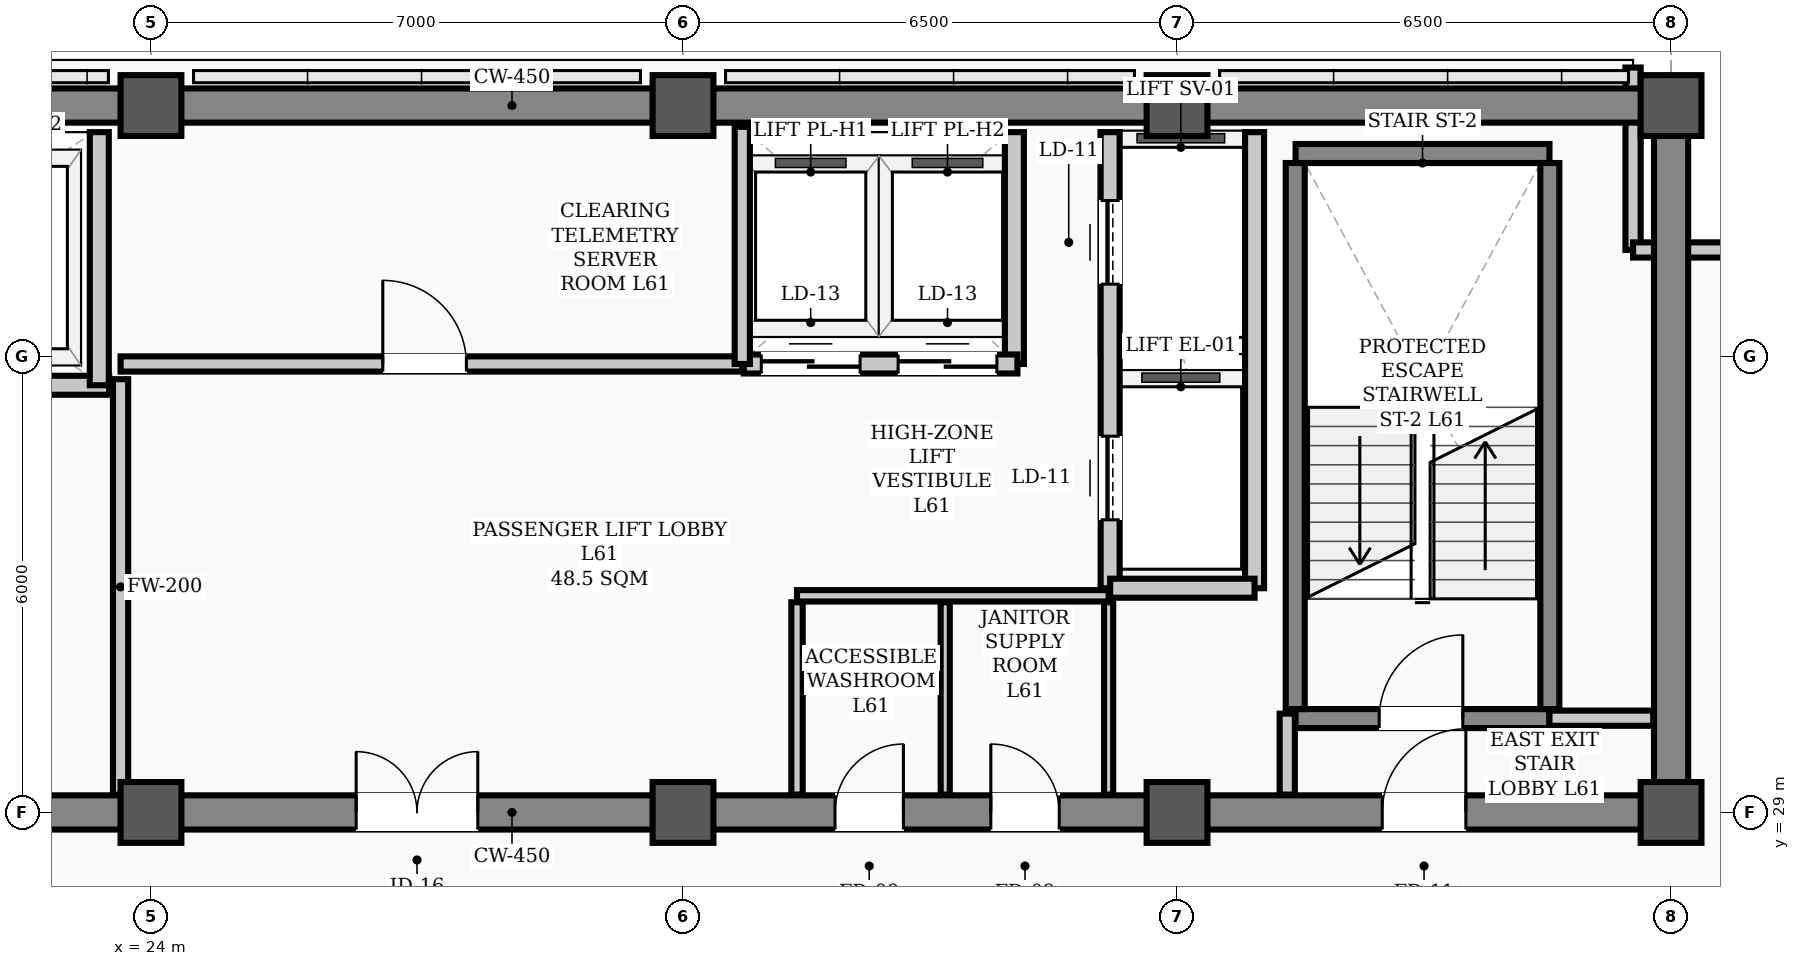
"""IFC4 building model, lengths in metres.
Left out: names, types, materials, properties, quantities, classifications, styles, units other than length and angle.
Written with IfcOpenShell. Run it as: python <this file> out.ifc"""

import sys

from ifc_helpers import new_model, si_unit, direction, frame, frame_2d, origin, origin_2d, place, context, subcontext, project, spatial, rectangle, hollow_rectangle, extrude, element, fill, save


model = new_model("IFC4")
c1 = context("Model", 3, precision=1e-05, world=origin(), true_north=direction((0.0, 1.0)))
c2 = subcontext(c1, "Body", "Model", "MODEL_VIEW")
j1 = project(units=[si_unit("LENGTHUNIT", "METRE"), si_unit("PLANEANGLEUNIT", "RADIAN")], contexts=[c1])
p1 = place(None, origin())
s1 = spatial("IfcSite", under=j1, at=p1, CompositionType="ELEMENT")
p2 = place(p1, origin())
s2 = spatial("IfcBuilding", under=s1, at=p2, CompositionType="ELEMENT")
p3 = place(p2, frame((0.0, 0.0, 246.2)))
s3 = spatial("IfcBuildingStorey", under=s2, at=p3, CompositionType="ELEMENT", Elevation=246.2)
for number, where, z_axis, x_axis in (
    (1, (24.0, 29.0, 0.0), (0.0, 0.0, 1.0), (1.0, 0.0, 0.0)),
    (2, (24.0, 38.3, 0.0), (0.0, 0.0, 1.0), (1.0, 0.0, 0.0)),
    (3, (31.0, 29.0, 0.0), (0.0, 0.0, 1.0), (1.0, 0.0, 0.0)),
    (4, (31.0, 38.3, 0.0), (0.0, 0.0, 1.0), (1.0, 0.0, 0.0)),
    (5, (37.5, 29.0, 0.0), (0.0, 0.0, 1.0), (1.0, 0.0, 0.0)),
    (6, (37.5, 38.3, 0.0), (0.0, 0.0, 1.0), (1.0, 0.0, 0.0)),
    (7, (44.0, 29.0, 0.0), (0.0, 0.0, 1.0), (1.0, 0.0, 0.0)),
    (8, (44.0, 38.3, 0.0), (0.0, 0.0, 1.0), (1.0, 0.0, 0.0)),
):
    element("IfcColumn", number, at=place(p3, frame(where, z_axis=z_axis, x_axis=x_axis)), inside=s3, PredefinedType="COLUMN", context=c2, shape_type="SweptSolid", body=[
        extrude(hollow_rectangle(XDim=0.8, YDim=0.8, WallThickness=0.032, InnerFilletRadius=0.016, OuterFilletRadius=0.048, at=origin_2d()), origin(), (0.0, 0.0, 1.0), 3.9),
    ])
p4 = place(p3, frame((43.5, 38.8, 0.0), z_axis=(0.0, 0.0, 1.0), x_axis=(0.0, -1.0, 0.0)))
e9 = element("IfcWall", 9, at=p4, inside=s3, PredefinedType="PARAPET", context=c2, shape_type="SweptSolid", body=[
    extrude(rectangle(XDim=2.4, YDim=0.2, at=frame_2d((1.2, 0.0))), origin(), (0.0, 0.0, 1.0), 1.2),
])
p5 = place(p3, frame((43.5, 36.4, 0.0), z_axis=(0.0, 0.0, 1.0), x_axis=(1.0, 0.0, 0.0)))
e10 = element("IfcWall", 10, at=p5, inside=s3, PredefinedType="PARAPET", context=c2, shape_type="SweptSolid", body=[
    extrude(rectangle(XDim=2.4, YDim=0.2, at=frame_2d((1.2, 0.0))), origin(), (0.0, 0.0, 1.0), 1.2),
])
p6 = place(p3, frame((13.5, 29.0, 0.0), z_axis=(0.0, 0.0, 1.0), x_axis=(1.0, 0.0, 0.0)))
e11 = element("IfcWall", 11, at=p6, inside=s3, PredefinedType="SHEAR", context=c2, shape_type="SweptSolid", body=[
    extrude(rectangle(XDim=30.5, YDim=0.45, at=frame_2d((15.25, 0.0))), origin(), (0.0, 0.0, 1.0), 3.72),
])
p7 = place(p6, frame((1.75, 0.0, 0.0)))
e12 = element("IfcOpeningElement", 12, at=p7, cuts=e11, PredefinedType="OPENING", context=c2, shape_type="SweptSolid", body=[
    extrude(rectangle(XDim=1.1, YDim=2.08, at=frame_2d((0.55, 1.04))), frame((0.0, 0.235, 0.0), z_axis=(0.0, -1.0, 0.0), x_axis=(1.0, 0.0, 0.0)), (0.0, 0.0, 1.0), 0.47),
])
p8 = place(p6, frame((26.7, 0.0, 0.0)))
e13 = element("IfcOpeningElement", 13, at=p8, cuts=e11, PredefinedType="OPENING", context=c2, shape_type="SweptSolid", body=[
    extrude(rectangle(XDim=1.1, YDim=2.08, at=frame_2d((0.55, 1.04))), frame((0.0, 0.235, 0.0), z_axis=(0.0, -1.0, 0.0), x_axis=(1.0, 0.0, 0.0)), (0.0, 0.0, 1.0), 0.47),
])
p9 = place(p6, frame((6.8, 0.0, 0.0)))
e14 = element("IfcOpeningElement", 14, at=p9, cuts=e11, PredefinedType="OPENING", context=c2, shape_type="SweptSolid", body=[
    extrude(rectangle(XDim=1.1, YDim=2.08, at=frame_2d((0.55, 1.04))), frame((0.0, 0.235, 0.0), z_axis=(0.0, -1.0, 0.0), x_axis=(1.0, 0.0, 0.0)), (0.0, 0.0, 1.0), 0.47),
])
p10 = place(p6, frame((13.2, 0.0, 0.0)))
e15 = element("IfcOpeningElement", 15, at=p10, cuts=e11, PredefinedType="OPENING", context=c2, shape_type="SweptSolid", body=[
    extrude(rectangle(XDim=1.6, YDim=2.08, at=frame_2d((0.8, 1.04))), frame((0.0, 0.235, 0.0), z_axis=(0.0, -1.0, 0.0), x_axis=(1.0, 0.0, 0.0)), (0.0, 0.0, 1.0), 0.47),
])
p11 = place(p6, frame((19.5, 0.0, 0.0)))
e16 = element("IfcOpeningElement", 16, at=p11, cuts=e11, PredefinedType="OPENING", context=c2, shape_type="SweptSolid", body=[
    extrude(rectangle(XDim=0.9, YDim=2.08, at=frame_2d((0.45, 1.04))), frame((0.0, 0.235, 0.0), z_axis=(0.0, -1.0, 0.0), x_axis=(1.0, 0.0, 0.0)), (0.0, 0.0, 1.0), 0.47),
])
p12 = place(p6, frame((21.55, 0.0, 0.0)))
e17 = element("IfcOpeningElement", 17, at=p12, cuts=e11, PredefinedType="OPENING", context=c2, shape_type="SweptSolid", body=[
    extrude(rectangle(XDim=0.9, YDim=2.08, at=frame_2d((0.45, 1.04))), frame((0.0, 0.235, 0.0), z_axis=(0.0, -1.0, 0.0), x_axis=(1.0, 0.0, 0.0)), (0.0, 0.0, 1.0), 0.47),
])
p13 = place(p3, frame((13.5, 38.3, 0.0), z_axis=(0.0, 0.0, 1.0), x_axis=(1.0, 0.0, 0.0)))
e18 = element("IfcWall", 18, at=p13, inside=s3, PredefinedType="SHEAR", context=c2, shape_type="SweptSolid", body=[
    extrude(rectangle(XDim=30.5, YDim=0.45, at=frame_2d((15.25, 0.0))), origin(), (0.0, 0.0, 1.0), 3.72),
])
p14 = place(p3, frame((44.0, 29.35, 0.0), z_axis=(0.0, 0.0, 1.0), x_axis=(0.0, 1.0, 0.0)))
e19 = element("IfcWall", 19, at=p14, inside=s3, PredefinedType="SHEAR", context=c2, shape_type="SweptSolid", body=[
    extrude(rectangle(XDim=8.6, YDim=0.45, at=frame_2d((4.3, 0.0))), origin(), (0.0, 0.0, 1.0), 3.72),
])
p15 = place(p3, frame((39.06, 30.235, 0.0), z_axis=(0.0, 0.0, 1.0), x_axis=(1.0, 0.0, 0.0)))
e20 = element("IfcWall", 20, at=p15, inside=s3, PredefinedType="STANDARD", context=c2, shape_type="SweptSolid", body=[
    extrude(rectangle(XDim=3.34, YDim=0.25, at=frame_2d((1.67, 0.0))), origin(), (0.0, 0.0, 1.0), 3.72),
])
p16 = place(p15, frame((1.1, 0.0, 0.0)))
e21 = element("IfcOpeningElement", 21, at=p16, cuts=e20, PredefinedType="OPENING", context=c2, shape_type="SweptSolid", body=[
    extrude(rectangle(XDim=1.1, YDim=2.08, at=frame_2d((0.55, 1.04))), frame((0.0, 0.135, 0.0), z_axis=(0.0, -1.0, 0.0), x_axis=(1.0, 0.0, 0.0)), (0.0, 0.0, 1.0), 0.27),
])
p17 = place(p3, frame((39.06, 37.669, 0.0), z_axis=(0.0, 0.0, 1.0), x_axis=(1.0, 0.0, 0.0)))
e22 = element("IfcWall", 22, at=p17, inside=s3, PredefinedType="STANDARD", context=c2, shape_type="SweptSolid", body=[
    extrude(rectangle(XDim=3.34, YDim=0.25, at=frame_2d((1.67, 0.0))), origin(), (0.0, 0.0, 1.0), 3.72),
])
for number, where, z_axis, x_axis in (
    (23, (39.055, 30.36, 0.0), (0.0, 0.0, 1.0), (0.0, 1.0, 0.0)),
    (24, (42.405, 30.36, 0.0), (0.0, 0.0, 1.0), (0.0, 1.0, 0.0)),
):
    element("IfcWall", number, at=place(p3, frame(where, z_axis=z_axis, x_axis=x_axis)), inside=s3, PredefinedType="STANDARD", context=c2, shape_type="SweptSolid", body=[
        extrude(rectangle(XDim=7.184, YDim=0.25, at=frame_2d((3.592, 0.0))), origin(), (0.0, 0.0, 1.0), 3.72),
    ])
p18 = place(p3, frame((18.1, 34.62, 0.0), z_axis=(0.0, 0.0, 1.0), x_axis=(1.0, 0.0, 0.0)))
e25 = element("IfcWall", 25, at=p18, inside=s3, PredefinedType="STANDARD", context=c2, shape_type="SweptSolid", body=[
    extrude(rectangle(XDim=5.35, YDim=0.25, at=frame_2d((2.675, 0.0))), origin(), (0.0, 0.0, 1.0), 3.72),
])
p19 = place(p18, frame((0.85, 0.0, 0.0)))
e26 = element("IfcOpeningElement", 26, at=p19, cuts=e25, PredefinedType="OPENING", context=c2, shape_type="SweptSolid", body=[
    extrude(rectangle(XDim=1.1, YDim=2.08, at=frame_2d((0.55, 1.04))), frame((0.0, 0.135, 0.0), z_axis=(0.0, -1.0, 0.0), x_axis=(1.0, 0.0, 0.0)), (0.0, 0.0, 1.0), 0.27),
])
p20 = place(p18, frame((3.45, 0.0, 0.0)))
e27 = element("IfcOpeningElement", 27, at=p20, cuts=e25, PredefinedType="OPENING", context=c2, shape_type="SweptSolid", body=[
    extrude(rectangle(XDim=1.1, YDim=2.08, at=frame_2d((0.55, 1.04))), frame((0.0, 0.135, 0.0), z_axis=(0.0, -1.0, 0.0), x_axis=(1.0, 0.0, 0.0)), (0.0, 0.0, 1.0), 0.27),
])
p21 = place(p3, frame((36.62, 31.95, 0.0), z_axis=(0.0, 0.0, 1.0), x_axis=(0.0, 1.0, 0.0)))
e28 = element("IfcWall", 28, at=p21, inside=s3, PredefinedType="STANDARD", context=c2, shape_type="SweptSolid", body=[
    extrude(rectangle(XDim=6.0, YDim=0.25, at=frame_2d((3.0, 0.0))), origin(), (0.0, 0.0, 1.0), 3.72),
])
p22 = place(p21, frame((0.9, 0.0, 0.0)))
e29 = element("IfcOpeningElement", 29, at=p22, cuts=e28, PredefinedType="OPENING", context=c2, shape_type="SweptSolid", body=[
    extrude(rectangle(XDim=1.1, YDim=2.08, at=frame_2d((0.55, 1.04))), frame((0.0, 0.135, 0.0), z_axis=(0.0, -1.0, 0.0), x_axis=(1.0, 0.0, 0.0)), (0.0, 0.0, 1.0), 0.27),
])
p23 = place(p21, frame((4.0, 0.0, 0.0)))
e30 = element("IfcOpeningElement", 30, at=p23, cuts=e28, PredefinedType="OPENING", context=c2, shape_type="SweptSolid", body=[
    extrude(rectangle(XDim=1.1, YDim=2.08, at=frame_2d((0.55, 1.04))), frame((0.0, 0.135, 0.0), z_axis=(0.0, -1.0, 0.0), x_axis=(1.0, 0.0, 0.0)), (0.0, 0.0, 1.0), 0.27),
])
p24 = place(p3, frame((38.52, 31.95, 0.0), z_axis=(0.0, 0.0, 1.0), x_axis=(0.0, 1.0, 0.0)))
e31 = element("IfcWall", 31, at=p24, inside=s3, PredefinedType="STANDARD", context=c2, shape_type="SweptSolid", body=[
    extrude(rectangle(XDim=6.0, YDim=0.25, at=frame_2d((3.0, 0.0))), origin(), (0.0, 0.0, 1.0), 3.48),
])
p25 = place(p3, frame((36.62, 31.95, 0.0), z_axis=(0.0, 0.0, 1.0), x_axis=(1.0, 0.0, 0.0)))
e32 = element("IfcWall", 32, at=p25, inside=s3, PredefinedType="STANDARD", context=c2, shape_type="SweptSolid", body=[
    extrude(rectangle(XDim=1.9, YDim=0.25, at=frame_2d((0.95, 0.0))), origin(), (0.0, 0.0, 1.0), 3.48),
])
p26 = place(p3, frame((23.32, 34.62, 0.0), z_axis=(0.0, 0.0, 1.0), x_axis=(0.0, 1.0, 0.0)))
e33 = element("IfcWall", 33, at=p26, inside=s3, PredefinedType="STANDARD", context=c2, shape_type="SweptSolid", body=[
    extrude(rectangle(XDim=3.33, YDim=0.25, at=frame_2d((1.665, 0.0))), origin(), (0.0, 0.0, 1.0), 3.72),
])
p27 = place(p3, frame((35.36, 34.9, 0.0), z_axis=(0.0, 0.0, 1.0), x_axis=(0.0, 1.0, 0.0)))
e34 = element("IfcWall", 34, at=p27, inside=s3, PredefinedType="STANDARD", context=c2, shape_type="SweptSolid", body=[
    extrude(rectangle(XDim=3.05, YDim=0.25, at=frame_2d((1.525, 0.0))), origin(), (0.0, 0.0, 1.0), 3.72),
])
p28 = place(p3, frame((31.8, 34.9, 0.0), z_axis=(0.0, 0.0, 1.0), x_axis=(1.0, 0.0, 0.0)))
e35 = element("IfcWall", 35, at=p28, inside=s3, PredefinedType="STANDARD", context=c2, shape_type="SweptSolid", body=[
    extrude(rectangle(XDim=3.6, YDim=0.25, at=frame_2d((1.8, 0.0))), origin(), (0.0, 0.0, 1.0), 3.72),
])
p29 = place(p28, frame((0.23, 0.0, 0.0)))
e36 = element("IfcOpeningElement", 36, at=p29, cuts=e35, PredefinedType="OPENING", context=c2, shape_type="SweptSolid", body=[
    extrude(rectangle(XDim=1.3, YDim=2.08, at=frame_2d((0.65, 1.04))), frame((0.0, 0.135, 0.0), z_axis=(0.0, -1.0, 0.0), x_axis=(1.0, 0.0, 0.0)), (0.0, 0.0, 1.0), 0.27),
])
p30 = place(p28, frame((2.03, 0.0, 0.0)))
e37 = element("IfcOpeningElement", 37, at=p30, cuts=e35, PredefinedType="OPENING", context=c2, shape_type="SweptSolid", body=[
    extrude(rectangle(XDim=1.3, YDim=2.08, at=frame_2d((0.65, 1.04))), frame((0.0, 0.135, 0.0), z_axis=(0.0, -1.0, 0.0), x_axis=(1.0, 0.0, 0.0)), (0.0, 0.0, 1.0), 0.27),
])
p31 = place(p3, frame((42.4, 30.24, 0.0), z_axis=(0.0, 0.0, 1.0), x_axis=(1.0, 0.0, 0.0)))
e38 = element("IfcWall", 38, at=p31, inside=s3, PredefinedType="STANDARD", context=c2, shape_type="SweptSolid", body=[
    extrude(rectangle(XDim=1.365, YDim=0.2, at=frame_2d((0.683, 0.0))), origin(), (0.0, 0.0, 1.0), 3.72),
])
p32 = place(p3, frame((23.6, 34.9, 0.0), z_axis=(0.0, 0.0, 1.0), x_axis=(1.0, 0.0, 0.0)))
e39 = element("IfcWall", 39, at=p32, inside=s3, PredefinedType="STANDARD", context=c2, shape_type="SweptSolid", body=[
    extrude(rectangle(XDim=8.18, YDim=0.2, at=frame_2d((4.09, 0.0))), origin(), (0.0, 0.0, 1.0), 3.72),
])
p33 = place(p32, frame((3.45, 0.0, 0.0)))
e40 = element("IfcOpeningElement", 40, at=p33, cuts=e39, PredefinedType="OPENING", context=c2, shape_type="SweptSolid", body=[
    extrude(rectangle(XDim=1.1, YDim=2.08, at=frame_2d((0.55, 1.04))), frame((0.0, 0.11, 0.0), z_axis=(0.0, -1.0, 0.0), x_axis=(1.0, 0.0, 0.0)), (0.0, 0.0, 1.0), 0.22),
])
p34 = place(p3, frame((32.5, 31.85, 0.0), z_axis=(0.0, 0.0, 1.0), x_axis=(1.0, 0.0, 0.0)))
e41 = element("IfcWall", 41, at=p34, inside=s3, PredefinedType="PARTITIONING", context=c2, shape_type="SweptSolid", body=[
    extrude(rectangle(XDim=4.1, YDim=0.15, at=frame_2d((2.05, 0.0))), origin(), (0.0, 0.0, 1.0), 3.72),
])
p35 = place(p3, frame((38.95, 29.235, 0.0), z_axis=(0.0, 0.0, 1.0), x_axis=(0.0, 1.0, 0.0)))
e42 = element("IfcWall", 42, at=p35, inside=s3, PredefinedType="STANDARD", context=c2, shape_type="SweptSolid", body=[
    extrude(rectangle(XDim=1.065, YDim=0.2, at=frame_2d((0.532, 0.0))), origin(), (0.0, 0.0, 1.0), 3.72),
])
p36 = place(p3, frame((23.6, 29.235, 0.0), z_axis=(0.0, 0.0, 1.0), x_axis=(0.0, 1.0, 0.0)))
e43 = element("IfcWall", 43, at=p36, inside=s3, PredefinedType="STANDARD", context=c2, shape_type="SweptSolid", body=[
    extrude(rectangle(XDim=5.465, YDim=0.2, at=frame_2d((2.732, 0.0))), origin(), (0.0, 0.0, 1.0), 3.2),
])
p37 = place(p3, frame((32.5, 29.235, 0.0), z_axis=(0.0, 0.0, 1.0), x_axis=(0.0, 1.0, 0.0)))
e44 = element("IfcWall", 44, at=p37, inside=s3, PredefinedType="PARTITIONING", context=c2, shape_type="SweptSolid", body=[
    extrude(rectangle(XDim=2.53, YDim=0.15, at=frame_2d((1.265, 0.0))), origin(), (0.0, 0.0, 1.0), 3.35),
])
for number, where, z_axis, x_axis in (
    (45, (36.6, 29.235, 0.0), (0.0, 0.0, 1.0), (0.0, 1.0, 0.0)),
    (46, (34.45, 29.235, 0.0), (0.0, 0.0, 1.0), (0.0, 1.0, 0.0)),
):
    element("IfcWall", number, at=place(p3, frame(where, z_axis=z_axis, x_axis=x_axis)), inside=s3, PredefinedType="PARTITIONING", context=c2, shape_type="SweptSolid", body=[
        extrude(rectangle(XDim=2.53, YDim=0.12, at=frame_2d((1.265, 0.0))), origin(), (0.0, 0.0, 1.0), 3.35),
    ])
p38 = place(p3, frame((31.78, 34.9, 0.0), z_axis=(0.0, 0.0, 1.0), x_axis=(0.0, 1.0, 0.0)))
e47 = element("IfcWall", 47, at=p38, inside=s3, PredefinedType="STANDARD", context=c2, shape_type="SweptSolid", body=[
    extrude(rectangle(XDim=3.12, YDim=0.2, at=frame_2d((1.56, 0.0))), origin(), (0.0, 0.0, 1.0), 3.72),
])
p39 = place(p16, origin())
e48 = element("IfcDoor", 48, at=p39, inside=s3, OperationType="SINGLE_SWING_RIGHT", PredefinedType="DOOR", context=c2, shape_type="SweptSolid", body=[
    extrude(rectangle(XDim=1.1, YDim=2.08, at=frame_2d((0.55, 1.04))), frame((0.0, 0.025, 0.0), z_axis=(0.0, -1.0, 0.0), x_axis=(1.0, 0.0, 0.0)), (0.0, 0.0, 1.0), 0.05),
])
fill(e21, e48)
p40 = place(p8, origin())
e49 = element("IfcDoor", 49, at=p40, inside=s3, OperationType="SINGLE_SWING_RIGHT", PredefinedType="DOOR", context=c2, shape_type="SweptSolid", body=[
    extrude(rectangle(XDim=1.1, YDim=2.08, at=frame_2d((0.55, 1.04))), frame((0.0, 0.025, 0.0), z_axis=(0.0, -1.0, 0.0), x_axis=(1.0, 0.0, 0.0)), (0.0, 0.0, 1.0), 0.05),
])
fill(e13, e49)
p41 = place(p10, origin())
e50 = element("IfcDoor", 50, at=p41, inside=s3, OperationType="DOUBLE_DOOR_SINGLE_SWING", PredefinedType="DOOR", context=c2, shape_type="SweptSolid", body=[
    extrude(rectangle(XDim=1.6, YDim=2.08, at=frame_2d((0.8, 1.04))), frame((0.0, 0.025, 0.0), z_axis=(0.0, -1.0, 0.0), x_axis=(1.0, 0.0, 0.0)), (0.0, 0.0, 1.0), 0.05),
])
fill(e15, e50)
p42 = place(p33, origin())
e51 = element("IfcDoor", 51, at=p42, inside=s3, OperationType="SINGLE_SWING_LEFT", PredefinedType="DOOR", context=c2, shape_type="SweptSolid", body=[
    extrude(rectangle(XDim=1.1, YDim=2.08, at=frame_2d((0.55, 1.04))), frame((0.0, 0.025, 0.0), z_axis=(0.0, -1.0, 0.0), x_axis=(1.0, 0.0, 0.0)), (0.0, 0.0, 1.0), 0.05),
])
fill(e40, e51)
p43 = place(p11, origin())
e52 = element("IfcDoor", 52, at=p43, inside=s3, OperationType="SINGLE_SWING_RIGHT", PredefinedType="DOOR", context=c2, shape_type="SweptSolid", body=[
    extrude(rectangle(XDim=0.9, YDim=2.08, at=frame_2d((0.45, 1.04))), frame((0.0, 0.025, 0.0), z_axis=(0.0, -1.0, 0.0), x_axis=(1.0, 0.0, 0.0)), (0.0, 0.0, 1.0), 0.05),
])
fill(e16, e52)
p44 = place(p12, origin())
e53 = element("IfcDoor", 53, at=p44, inside=s3, OperationType="SINGLE_SWING_LEFT", PredefinedType="DOOR", context=c2, shape_type="SweptSolid", body=[
    extrude(rectangle(XDim=0.9, YDim=2.08, at=frame_2d((0.45, 1.04))), frame((0.0, 0.025, 0.0), z_axis=(0.0, -1.0, 0.0), x_axis=(1.0, 0.0, 0.0)), (0.0, 0.0, 1.0), 0.05),
])
fill(e17, e53)
p45 = place(p22, origin())
e54 = element("IfcDoor", 54, at=p45, inside=s3, OperationType="SLIDING_TO_LEFT", PredefinedType="DOOR", context=c2, shape_type="SweptSolid", body=[
    extrude(rectangle(XDim=1.1, YDim=2.08, at=frame_2d((0.55, 1.04))), frame((0.0, 0.025, 0.0), z_axis=(0.0, -1.0, 0.0), x_axis=(1.0, 0.0, 0.0)), (0.0, 0.0, 1.0), 0.05),
])
fill(e29, e54)
p46 = place(p23, origin())
e55 = element("IfcDoor", 55, at=p46, inside=s3, OperationType="SLIDING_TO_LEFT", PredefinedType="DOOR", context=c2, shape_type="SweptSolid", body=[
    extrude(rectangle(XDim=1.1, YDim=2.08, at=frame_2d((0.55, 1.04))), frame((0.0, 0.025, 0.0), z_axis=(0.0, -1.0, 0.0), x_axis=(1.0, 0.0, 0.0)), (0.0, 0.0, 1.0), 0.05),
])
fill(e30, e55)
p47 = place(p29, origin())
e56 = element("IfcDoor", 56, at=p47, inside=s3, OperationType="DOUBLE_DOOR_SLIDING", PredefinedType="DOOR", context=c2, shape_type="SweptSolid", body=[
    extrude(rectangle(XDim=1.3, YDim=2.08, at=frame_2d((0.65, 1.04))), frame((0.0, 0.025, 0.0), z_axis=(0.0, -1.0, 0.0), x_axis=(1.0, 0.0, 0.0)), (0.0, 0.0, 1.0), 0.05),
])
fill(e36, e56)
p48 = place(p30, origin())
e57 = element("IfcDoor", 57, at=p48, inside=s3, OperationType="DOUBLE_DOOR_SLIDING", PredefinedType="DOOR", context=c2, shape_type="SweptSolid", body=[
    extrude(rectangle(XDim=1.3, YDim=2.08, at=frame_2d((0.65, 1.04))), frame((0.0, 0.025, 0.0), z_axis=(0.0, -1.0, 0.0), x_axis=(1.0, 0.0, 0.0)), (0.0, 0.0, 1.0), 0.05),
])
fill(e37, e57)
save(model, sys.argv[1])
